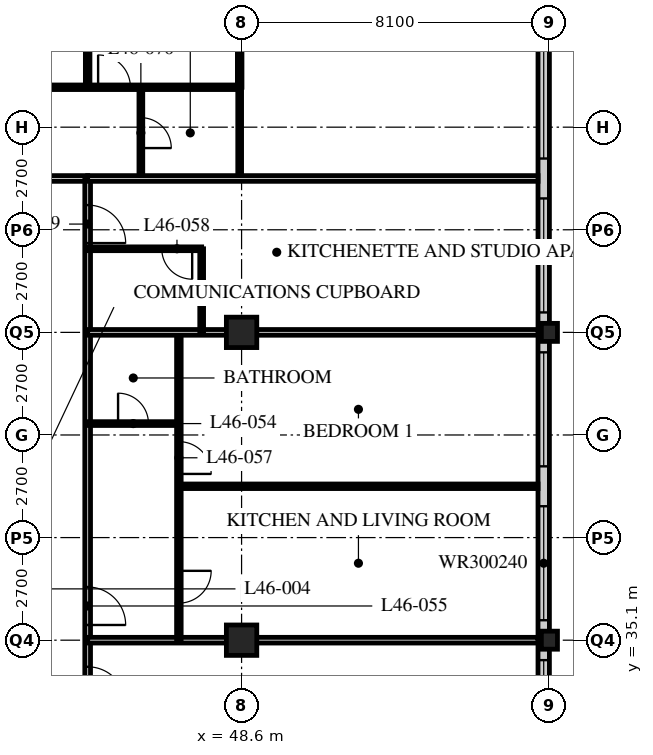
"""IFC4 building model, lengths in metres.
Left out: names, types, materials, properties, quantities, classifications, styles, units other than length and angle.
Written with IfcOpenShell. Run it as: python <this file> out.ifc"""

import sys

from ifc_helpers import new_model, si_unit, direction, frame, frame_2d, origin, origin_2d, place, context, subcontext, project, spatial, rectangle, hollow_rectangle, i_section, extrude, element, fill, save


model = new_model("IFC4")
c1 = context("Model", 3, precision=1e-05, world=origin(), true_north=direction((0.0, 1.0)))
c2 = subcontext(c1, "Body", "Model", "MODEL_VIEW")
j1 = project(units=[si_unit("LENGTHUNIT", "METRE"), si_unit("PLANEANGLEUNIT", "RADIAN")], contexts=[c1])
p1 = place(None, origin())
s1 = spatial("IfcSite", under=j1, at=p1, CompositionType="ELEMENT")
p2 = place(p1, origin())
s2 = spatial("IfcBuilding", under=s1, at=p2, CompositionType="ELEMENT")
p3 = place(p2, frame((0.0, 0.0, 181.2)))
s3 = spatial("IfcBuildingStorey", under=s2, at=p3, CompositionType="ELEMENT", Elevation=181.2)
for number, where, z_axis, x_axis in (
    (1, (48.6, 35.1, 0.0), (0.0, 0.0, 1.0), (1.0, 0.0, 0.0)),
    (2, (48.6, 43.2, 0.0), (0.0, 0.0, 1.0), (1.0, 0.0, 0.0)),
):
    element("IfcColumn", number, at=place(p3, frame(where, z_axis=z_axis, x_axis=x_axis)), inside=s3, PredefinedType="COLUMN", context=c2, shape_type="SweptSolid", body=[
        extrude(hollow_rectangle(XDim=0.8, YDim=0.8, WallThickness=0.08, at=origin_2d()), origin(), (0.0, 0.0, 1.0), 3.6),
    ])
for number, where, z_axis, x_axis in (
    (3, (56.7, 35.1, 0.0), (0.0, 0.0, 1.0), (1.0, 0.0, 0.0)),
    (4, (56.7, 43.2, 0.0), (0.0, 0.0, 1.0), (1.0, 0.0, 0.0)),
):
    element("IfcColumn", number, at=place(p3, frame(where, z_axis=z_axis, x_axis=x_axis)), inside=s3, PredefinedType="COLUMN", context=c2, shape_type="SweptSolid", body=[
        extrude(i_section(OverallWidth=0.424, OverallDepth=0.475, WebThickness=0.048, FlangeThickness=0.077, FilletRadius=0.015, at=origin_2d()), origin(), (0.0, 0.0, 1.0), 3.6),
    ])
p4 = place(p3, frame((56.55, 19.2, 0.0), z_axis=(0.0, 0.0, 1.0), x_axis=(0.0, 1.0, 0.0)))
e5 = element("IfcWall", 5, at=p4, inside=s3, PredefinedType="SOLIDWALL", context=c2, shape_type="SweptSolid", body=[
    extrude(rectangle(XDim=32.1, YDim=0.3, at=frame_2d((16.05, 0.0))), origin(), (0.0, 0.0, 1.0), 3.39),
])
p5 = place(p4, frame((0.225, 0.0, 0.6)))
e6 = element("IfcOpeningElement", 6, at=p5, cuts=e5, PredefinedType="OPENING", context=c2, shape_type="SweptSolid", body=[
    extrude(rectangle(XDim=3.0, YDim=2.4, at=frame_2d((1.5, 1.2))), frame((0.0, 0.16, 0.0), z_axis=(0.0, -1.0, 0.0), x_axis=(1.0, 0.0, 0.0)), (0.0, 0.0, 1.0), 0.32),
])
p6 = place(p4, frame((4.275, 0.0, 0.6)))
e7 = element("IfcOpeningElement", 7, at=p6, cuts=e5, PredefinedType="OPENING", context=c2, shape_type="SweptSolid", body=[
    extrude(rectangle(XDim=3.0, YDim=2.4, at=frame_2d((1.5, 1.2))), frame((0.0, 0.16, 0.0), z_axis=(0.0, -1.0, 0.0), x_axis=(1.0, 0.0, 0.0)), (0.0, 0.0, 1.0), 0.32),
])
p7 = place(p4, frame((8.325, 0.0, 0.6)))
e8 = element("IfcOpeningElement", 8, at=p7, cuts=e5, PredefinedType="OPENING", context=c2, shape_type="SweptSolid", body=[
    extrude(rectangle(XDim=3.0, YDim=2.4, at=frame_2d((1.5, 1.2))), frame((0.0, 0.16, 0.0), z_axis=(0.0, -1.0, 0.0), x_axis=(1.0, 0.0, 0.0)), (0.0, 0.0, 1.0), 0.32),
])
p8 = place(p4, frame((12.375, 0.0, 0.6)))
e9 = element("IfcOpeningElement", 9, at=p8, cuts=e5, PredefinedType="OPENING", context=c2, shape_type="SweptSolid", body=[
    extrude(rectangle(XDim=3.0, YDim=2.4, at=frame_2d((1.5, 1.2))), frame((0.0, 0.16, 0.0), z_axis=(0.0, -1.0, 0.0), x_axis=(1.0, 0.0, 0.0)), (0.0, 0.0, 1.0), 0.32),
])
p9 = place(p4, frame((16.425, 0.0, 0.6)))
e10 = element("IfcOpeningElement", 10, at=p9, cuts=e5, PredefinedType="OPENING", context=c2, shape_type="SweptSolid", body=[
    extrude(rectangle(XDim=3.0, YDim=2.4, at=frame_2d((1.5, 1.2))), frame((0.0, 0.16, 0.0), z_axis=(0.0, -1.0, 0.0), x_axis=(1.0, 0.0, 0.0)), (0.0, 0.0, 1.0), 0.32),
])
p10 = place(p4, frame((20.475, 0.0, 0.6)))
e11 = element("IfcOpeningElement", 11, at=p10, cuts=e5, PredefinedType="OPENING", context=c2, shape_type="SweptSolid", body=[
    extrude(rectangle(XDim=3.0, YDim=2.4, at=frame_2d((1.5, 1.2))), frame((0.0, 0.16, 0.0), z_axis=(0.0, -1.0, 0.0), x_axis=(1.0, 0.0, 0.0)), (0.0, 0.0, 1.0), 0.32),
])
p11 = place(p4, frame((24.525, 0.0, 0.6)))
e12 = element("IfcOpeningElement", 12, at=p11, cuts=e5, PredefinedType="OPENING", context=c2, shape_type="SweptSolid", body=[
    extrude(rectangle(XDim=3.0, YDim=2.4, at=frame_2d((1.5, 1.2))), frame((0.0, 0.16, 0.0), z_axis=(0.0, -1.0, 0.0), x_axis=(1.0, 0.0, 0.0)), (0.0, 0.0, 1.0), 0.32),
])
p12 = place(p4, frame((28.575, 0.0, 0.6)))
e13 = element("IfcOpeningElement", 13, at=p12, cuts=e5, PredefinedType="OPENING", context=c2, shape_type="SweptSolid", body=[
    extrude(rectangle(XDim=3.0, YDim=2.4, at=frame_2d((1.5, 1.2))), frame((0.0, 0.16, 0.0), z_axis=(0.0, -1.0, 0.0), x_axis=(1.0, 0.0, 0.0)), (0.0, 0.0, 1.0), 0.32),
])
p13 = place(p3, frame((12.15, 47.25, 0.0), z_axis=(0.0, 0.0, 1.0), x_axis=(1.0, 0.0, 0.0)))
e14 = element("IfcWall", 14, at=p13, inside=s3, PredefinedType="PARTITIONING", context=c2, shape_type="SweptSolid", body=[
    extrude(rectangle(XDim=32.4, YDim=0.15, at=frame_2d((16.2, 0.0))), origin(), (0.0, 0.0, 1.0), 3.39),
])
p14 = place(p13, frame((4.45, 0.0, 0.0)))
e15 = element("IfcOpeningElement", 15, at=p14, cuts=e14, PredefinedType="OPENING", context=c2, shape_type="SweptSolid", body=[
    extrude(rectangle(XDim=1.0, YDim=2.1, at=frame_2d((0.5, 1.05))), frame((0.0, 0.085, 0.0), z_axis=(0.0, -1.0, 0.0), x_axis=(1.0, 0.0, 0.0)), (0.0, 0.0, 1.0), 0.17),
])
p15 = place(p13, frame((16.6, 0.0, 0.0)))
e16 = element("IfcOpeningElement", 16, at=p15, cuts=e14, PredefinedType="OPENING", context=c2, shape_type="SweptSolid", body=[
    extrude(rectangle(XDim=1.0, YDim=2.1, at=frame_2d((0.5, 1.05))), frame((0.0, 0.085, 0.0), z_axis=(0.0, -1.0, 0.0), x_axis=(1.0, 0.0, 0.0)), (0.0, 0.0, 1.0), 0.17),
])
p16 = place(p13, frame((29.875, 0.0, 0.0)))
e17 = element("IfcOpeningElement", 17, at=p16, cuts=e14, PredefinedType="OPENING", context=c2, shape_type="SweptSolid", body=[
    extrude(rectangle(XDim=1.0, YDim=2.1, at=frame_2d((0.5, 1.05))), frame((0.0, 0.085, 0.0), z_axis=(0.0, -1.0, 0.0), x_axis=(1.0, 0.0, 0.0)), (0.0, 0.0, 1.0), 0.17),
])
p17 = place(p13, frame((1.525, 0.0, 0.0)))
e18 = element("IfcOpeningElement", 18, at=p17, cuts=e14, PredefinedType="OPENING", context=c2, shape_type="SweptSolid", body=[
    extrude(rectangle(XDim=1.0, YDim=2.1, at=frame_2d((0.5, 1.05))), frame((0.0, 0.085, 0.0), z_axis=(0.0, -1.0, 0.0), x_axis=(1.0, 0.0, 0.0)), (0.0, 0.0, 1.0), 0.17),
])
p18 = place(p3, frame((44.55, 18.9, 0.0), z_axis=(0.0, 0.0, 1.0), x_axis=(0.0, 1.0, 0.0)))
e19 = element("IfcWall", 19, at=p18, inside=s3, PredefinedType="PARTITIONING", context=c2, shape_type="SweptSolid", body=[
    extrude(rectangle(XDim=28.35, YDim=0.15, at=frame_2d((14.175, 0.0))), origin(), (0.0, 0.0, 1.0), 3.39),
])
p19 = place(p18, frame((0.4, 0.0, 0.0)))
e20 = element("IfcOpeningElement", 20, at=p19, cuts=e19, PredefinedType="OPENING", context=c2, shape_type="SweptSolid", body=[
    extrude(rectangle(XDim=1.0, YDim=2.1, at=frame_2d((0.5, 1.05))), frame((0.0, 0.085, 0.0), z_axis=(0.0, -1.0, 0.0), x_axis=(1.0, 0.0, 0.0)), (0.0, 0.0, 1.0), 0.17),
])
p20 = place(p18, frame((10.45, 0.0, 0.0)))
e21 = element("IfcOpeningElement", 21, at=p20, cuts=e19, PredefinedType="OPENING", context=c2, shape_type="SweptSolid", body=[
    extrude(rectangle(XDim=1.0, YDim=2.1, at=frame_2d((0.5, 1.05))), frame((0.0, 0.085, 0.0), z_axis=(0.0, -1.0, 0.0), x_axis=(1.0, 0.0, 0.0)), (0.0, 0.0, 1.0), 0.17),
])
p21 = place(p18, frame((14.5, 0.0, 0.0)))
e22 = element("IfcOpeningElement", 22, at=p21, cuts=e19, PredefinedType="OPENING", context=c2, shape_type="SweptSolid", body=[
    extrude(rectangle(XDim=1.0, YDim=2.1, at=frame_2d((0.5, 1.05))), frame((0.0, 0.085, 0.0), z_axis=(0.0, -1.0, 0.0), x_axis=(1.0, 0.0, 0.0)), (0.0, 0.0, 1.0), 0.17),
])
p22 = place(p18, frame((16.6, 0.0, 0.0)))
e23 = element("IfcOpeningElement", 23, at=p22, cuts=e19, PredefinedType="OPENING", context=c2, shape_type="SweptSolid", body=[
    extrude(rectangle(XDim=1.0, YDim=2.1, at=frame_2d((0.5, 1.05))), frame((0.0, 0.085, 0.0), z_axis=(0.0, -1.0, 0.0), x_axis=(1.0, 0.0, 0.0)), (0.0, 0.0, 1.0), 0.17),
])
p23 = place(p18, frame((26.65, 0.0, 0.0)))
e24 = element("IfcOpeningElement", 24, at=p23, cuts=e19, PredefinedType="OPENING", context=c2, shape_type="SweptSolid", body=[
    extrude(rectangle(XDim=1.0, YDim=2.1, at=frame_2d((0.5, 1.05))), frame((0.0, 0.085, 0.0), z_axis=(0.0, -1.0, 0.0), x_axis=(1.0, 0.0, 0.0)), (0.0, 0.0, 1.0), 0.17),
])
p24 = place(p3, frame((44.55, 35.1, 0.0), z_axis=(0.0, 0.0, 1.0), x_axis=(1.0, 0.0, 0.0)))
e25 = element("IfcWall", 25, at=p24, inside=s3, PredefinedType="PARTITIONING", context=c2, shape_type="SweptSolid", body=[
    extrude(rectangle(XDim=11.85, YDim=0.15, at=frame_2d((5.925, 0.0))), origin(), (0.0, 0.0, 1.0), 2.778),
])
p25 = place(p3, frame((46.95, 35.1, 0.0), z_axis=(0.0, 0.0, 1.0), x_axis=(0.0, 1.0, 0.0)))
e26 = element("IfcWall", 26, at=p25, inside=s3, PredefinedType="PARTITIONING", context=c2, shape_type="SweptSolid", body=[
    extrude(rectangle(XDim=8.1, YDim=0.12, at=frame_2d((4.05, 0.0))), origin(), (0.0, 0.0, 1.0), 3.39),
])
p26 = place(p25, frame((0.975, 0.0, 0.0)))
e27 = element("IfcOpeningElement", 27, at=p26, cuts=e26, PredefinedType="OPENING", context=c2, shape_type="SweptSolid", body=[
    extrude(rectangle(XDim=0.85, YDim=2.1, at=frame_2d((0.425, 1.05))), frame((0.0, 0.07, 0.0), z_axis=(0.0, -1.0, 0.0), x_axis=(1.0, 0.0, 0.0)), (0.0, 0.0, 1.0), 0.14),
])
p27 = place(p25, frame((4.375, 0.0, 0.0)))
e28 = element("IfcOpeningElement", 28, at=p27, cuts=e26, PredefinedType="OPENING", context=c2, shape_type="SweptSolid", body=[
    extrude(rectangle(XDim=0.85, YDim=2.1, at=frame_2d((0.425, 1.05))), frame((0.0, 0.07, 0.0), z_axis=(0.0, -1.0, 0.0), x_axis=(1.0, 0.0, 0.0)), (0.0, 0.0, 1.0), 0.14),
])
p28 = place(p3, frame((44.55, 40.8, 0.0), z_axis=(0.0, 0.0, 1.0), x_axis=(1.0, 0.0, 0.0)))
e29 = element("IfcWall", 29, at=p28, inside=s3, PredefinedType="PARTITIONING", context=c2, shape_type="SweptSolid", body=[
    extrude(rectangle(XDim=2.4, YDim=0.1, at=frame_2d((1.2, 0.0))), origin(), (0.0, 0.0, 1.0), 3.39),
])
p29 = place(p28, frame((0.8, 0.0, 0.0)))
e30 = element("IfcOpeningElement", 30, at=p29, cuts=e29, PredefinedType="OPENING", context=c2, shape_type="SweptSolid", body=[
    extrude(rectangle(XDim=0.8, YDim=2.1, at=frame_2d((0.4, 1.05))), frame((0.0, 0.06, 0.0), z_axis=(0.0, -1.0, 0.0), x_axis=(1.0, 0.0, 0.0)), (0.0, 0.0, 1.0), 0.12),
])
p30 = place(p3, frame((46.95, 39.15, 0.0), z_axis=(0.0, 0.0, 1.0), x_axis=(1.0, 0.0, 0.0)))
e31 = element("IfcWall", 31, at=p30, inside=s3, PredefinedType="PARTITIONING", context=c2, shape_type="SweptSolid", body=[
    extrude(rectangle(XDim=9.45, YDim=0.12, at=frame_2d((4.725, 0.0))), origin(), (0.0, 0.0, 1.0), 3.39),
])
p31 = place(p3, frame((44.55, 43.2, 0.0), z_axis=(0.0, 0.0, 1.0), x_axis=(1.0, 0.0, 0.0)))
e32 = element("IfcWall", 32, at=p31, inside=s3, PredefinedType="PARTITIONING", context=c2, shape_type="SweptSolid", body=[
    extrude(rectangle(XDim=11.85, YDim=0.15, at=frame_2d((5.925, 0.0))), origin(), (0.0, 0.0, 1.0), 2.778),
])
p32 = place(p3, frame((47.55, 43.2, 0.0), z_axis=(0.0, 0.0, 1.0), x_axis=(0.0, 1.0, 0.0)))
e33 = element("IfcWall", 33, at=p32, inside=s3, PredefinedType="PARTITIONING", context=c2, shape_type="SweptSolid", body=[
    extrude(rectangle(XDim=2.2, YDim=0.1, at=frame_2d((1.1, 0.0))), origin(), (0.0, 0.0, 1.0), 3.39),
])
p33 = place(p3, frame((44.55, 45.4, 0.0), z_axis=(0.0, 0.0, 1.0), x_axis=(1.0, 0.0, 0.0)))
e34 = element("IfcWall", 34, at=p33, inside=s3, PredefinedType="PARTITIONING", context=c2, shape_type="SweptSolid", body=[
    extrude(rectangle(XDim=3.0, YDim=0.1, at=frame_2d((1.5, 0.0))), origin(), (0.0, 0.0, 1.0), 3.39),
])
p34 = place(p33, frame((1.95, 0.0, 0.0)))
e35 = element("IfcOpeningElement", 35, at=p34, cuts=e34, PredefinedType="OPENING", context=c2, shape_type="SweptSolid", body=[
    extrude(rectangle(XDim=0.8, YDim=2.1, at=frame_2d((0.4, 1.05))), frame((0.0, 0.06, 0.0), z_axis=(0.0, -1.0, 0.0), x_axis=(1.0, 0.0, 0.0)), (0.0, 0.0, 1.0), 0.12),
])
p35 = place(p3, frame((45.95, 47.25, 0.0), z_axis=(0.0, 0.0, 1.0), x_axis=(0.0, 1.0, 0.0)))
e36 = element("IfcWall", 36, at=p35, inside=s3, PredefinedType="PARTITIONING", context=c2, shape_type="SweptSolid", body=[
    extrude(rectangle(XDim=2.4, YDim=0.1, at=frame_2d((1.2, 0.0))), origin(), (0.0, 0.0, 1.0), 3.39),
])
p36 = place(p35, frame((0.8, 0.0, 0.0)))
e37 = element("IfcOpeningElement", 37, at=p36, cuts=e36, PredefinedType="OPENING", context=c2, shape_type="SweptSolid", body=[
    extrude(rectangle(XDim=0.8, YDim=2.1, at=frame_2d((0.4, 1.05))), frame((0.0, 0.06, 0.0), z_axis=(0.0, -1.0, 0.0), x_axis=(1.0, 0.0, 0.0)), (0.0, 0.0, 1.0), 0.12),
])
p37 = place(p3, frame((48.55, 47.25, 0.0), z_axis=(0.0, 0.0, 1.0), x_axis=(0.0, 1.0, 0.0)))
e38 = element("IfcWall", 38, at=p37, inside=s3, PredefinedType="PARTITIONING", context=c2, shape_type="SweptSolid", body=[
    extrude(rectangle(XDim=2.4, YDim=0.1, at=frame_2d((1.2, 0.0))), origin(), (0.0, 0.0, 1.0), 2.778),
])
p38 = place(p3, frame((44.55, 49.65, 0.0), z_axis=(0.0, 0.0, 1.0), x_axis=(0.0, 1.0, 0.0)))
e39 = element("IfcWall", 39, at=p38, inside=s3, PredefinedType="PARTITIONING", context=c2, shape_type="SweptSolid", body=[
    extrude(rectangle(XDim=9.45, YDim=0.12, at=frame_2d((4.725, 0.0))), origin(), (0.0, 0.0, 1.0), 3.39),
])
p39 = place(p3, frame((44.55, 47.25, 0.0), z_axis=(0.0, 0.0, 1.0), x_axis=(1.0, 0.0, 0.0)))
e40 = element("IfcWall", 40, at=p39, inside=s3, PredefinedType="PARTITIONING", context=c2, shape_type="SweptSolid", body=[
    extrude(rectangle(XDim=11.85, YDim=0.15, at=frame_2d((5.925, 0.0))), origin(), (0.0, 0.0, 1.0), 3.39),
])
p40 = place(p3, frame((8.15, 49.65, 0.0), z_axis=(0.0, 0.0, 1.0), x_axis=(1.0, 0.0, 0.0)))
e41 = element("IfcWall", 41, at=p40, inside=s3, PredefinedType="PARTITIONING", context=c2, shape_type="SweptSolid", body=[
    extrude(rectangle(XDim=40.4, YDim=0.12, at=frame_2d((20.2, 0.0))), origin(), (0.0, 0.0, 1.0), 3.39),
])
p41 = place(p40, frame((9.025, 0.0, 0.0)))
e42 = element("IfcOpeningElement", 42, at=p41, cuts=e41, PredefinedType="OPENING", context=c2, shape_type="SweptSolid", body=[
    extrude(rectangle(XDim=0.85, YDim=2.1, at=frame_2d((0.425, 1.05))), frame((0.0, 0.07, 0.0), z_axis=(0.0, -1.0, 0.0), x_axis=(1.0, 0.0, 0.0)), (0.0, 0.0, 1.0), 0.14),
])
p42 = place(p40, frame((16.475, 0.0, 0.0)))
e43 = element("IfcOpeningElement", 43, at=p42, cuts=e41, PredefinedType="OPENING", context=c2, shape_type="SweptSolid", body=[
    extrude(rectangle(XDim=0.85, YDim=2.1, at=frame_2d((0.425, 1.05))), frame((0.0, 0.07, 0.0), z_axis=(0.0, -1.0, 0.0), x_axis=(1.0, 0.0, 0.0)), (0.0, 0.0, 1.0), 0.14),
])
p43 = place(p40, frame((21.175, 0.0, 0.0)))
e44 = element("IfcOpeningElement", 44, at=p43, cuts=e41, PredefinedType="OPENING", context=c2, shape_type="SweptSolid", body=[
    extrude(rectangle(XDim=0.85, YDim=2.1, at=frame_2d((0.425, 1.05))), frame((0.0, 0.07, 0.0), z_axis=(0.0, -1.0, 0.0), x_axis=(1.0, 0.0, 0.0)), (0.0, 0.0, 1.0), 0.14),
])
p44 = place(p40, frame((28.625, 0.0, 0.0)))
e45 = element("IfcOpeningElement", 45, at=p44, cuts=e41, PredefinedType="OPENING", context=c2, shape_type="SweptSolid", body=[
    extrude(rectangle(XDim=0.85, YDim=2.1, at=frame_2d((0.425, 1.05))), frame((0.0, 0.07, 0.0), z_axis=(0.0, -1.0, 0.0), x_axis=(1.0, 0.0, 0.0)), (0.0, 0.0, 1.0), 0.14),
])
p45 = place(p40, frame((32.825, 0.0, 0.0)))
e46 = element("IfcOpeningElement", 46, at=p45, cuts=e41, PredefinedType="OPENING", context=c2, shape_type="SweptSolid", body=[
    extrude(rectangle(XDim=0.85, YDim=2.1, at=frame_2d((0.425, 1.05))), frame((0.0, 0.07, 0.0), z_axis=(0.0, -1.0, 0.0), x_axis=(1.0, 0.0, 0.0)), (0.0, 0.0, 1.0), 0.14),
])
p46 = place(p40, frame((36.675, 0.0, 0.0)))
e47 = element("IfcOpeningElement", 47, at=p46, cuts=e41, PredefinedType="OPENING", context=c2, shape_type="SweptSolid", body=[
    extrude(rectangle(XDim=0.85, YDim=2.1, at=frame_2d((0.425, 1.05))), frame((0.0, 0.07, 0.0), z_axis=(0.0, -1.0, 0.0), x_axis=(1.0, 0.0, 0.0)), (0.0, 0.0, 1.0), 0.14),
])
p47 = place(p40, frame((6.725, 0.0, 0.0)))
e48 = element("IfcOpeningElement", 48, at=p47, cuts=e41, PredefinedType="OPENING", context=c2, shape_type="SweptSolid", body=[
    extrude(rectangle(XDim=0.85, YDim=2.1, at=frame_2d((0.425, 1.05))), frame((0.0, 0.07, 0.0), z_axis=(0.0, -1.0, 0.0), x_axis=(1.0, 0.0, 0.0)), (0.0, 0.0, 1.0), 0.14),
])
p48 = place(p40, frame((2.875, 0.0, 0.0)))
e49 = element("IfcOpeningElement", 49, at=p48, cuts=e41, PredefinedType="OPENING", context=c2, shape_type="SweptSolid", body=[
    extrude(rectangle(XDim=0.85, YDim=2.1, at=frame_2d((0.425, 1.05))), frame((0.0, 0.07, 0.0), z_axis=(0.0, -1.0, 0.0), x_axis=(1.0, 0.0, 0.0)), (0.0, 0.0, 1.0), 0.14),
])
p49 = place(p3, frame((48.55, 49.65, 0.0), z_axis=(0.0, 0.0, 1.0), x_axis=(0.0, 1.0, 0.0)))
e50 = element("IfcWall", 50, at=p49, inside=s3, PredefinedType="PARTITIONING", context=c2, shape_type="SweptSolid", body=[
    extrude(rectangle(XDim=1.25, YDim=0.12, at=frame_2d((0.625, 0.0))), origin(), (0.0, 0.0, 1.0), 2.778),
])
p50 = place(p8, origin())
e51 = element("IfcWindow", 51, at=p50, inside=s3, PartitioningType="SINGLE_PANEL", PredefinedType="WINDOW", context=c2, shape_type="SweptSolid", body=[
    extrude(rectangle(XDim=3.0, YDim=2.4, at=frame_2d((1.5, 1.2))), frame((0.0, 0.03, 0.0), z_axis=(0.0, -1.0, 0.0), x_axis=(1.0, 0.0, 0.0)), (0.0, 0.0, 1.0), 0.06),
])
fill(e9, e51)
p51 = place(p9, origin())
e52 = element("IfcWindow", 52, at=p51, inside=s3, PartitioningType="SINGLE_PANEL", PredefinedType="WINDOW", context=c2, shape_type="SweptSolid", body=[
    extrude(rectangle(XDim=3.0, YDim=2.4, at=frame_2d((1.5, 1.2))), frame((0.0, 0.03, 0.0), z_axis=(0.0, -1.0, 0.0), x_axis=(1.0, 0.0, 0.0)), (0.0, 0.0, 1.0), 0.06),
])
fill(e10, e52)
p52 = place(p10, origin())
e53 = element("IfcWindow", 53, at=p52, inside=s3, PartitioningType="SINGLE_PANEL", PredefinedType="WINDOW", context=c2, shape_type="SweptSolid", body=[
    extrude(rectangle(XDim=3.0, YDim=2.4, at=frame_2d((1.5, 1.2))), frame((0.0, 0.03, 0.0), z_axis=(0.0, -1.0, 0.0), x_axis=(1.0, 0.0, 0.0)), (0.0, 0.0, 1.0), 0.06),
])
fill(e11, e53)
p53 = place(p11, origin())
e54 = element("IfcWindow", 54, at=p53, inside=s3, PartitioningType="SINGLE_PANEL", PredefinedType="WINDOW", context=c2, shape_type="SweptSolid", body=[
    extrude(rectangle(XDim=3.0, YDim=2.4, at=frame_2d((1.5, 1.2))), frame((0.0, 0.03, 0.0), z_axis=(0.0, -1.0, 0.0), x_axis=(1.0, 0.0, 0.0)), (0.0, 0.0, 1.0), 0.06),
])
fill(e12, e54)
p54 = place(p12, origin())
e55 = element("IfcWindow", 55, at=p54, inside=s3, PartitioningType="SINGLE_PANEL", PredefinedType="WINDOW", context=c2, shape_type="SweptSolid", body=[
    extrude(rectangle(XDim=3.0, YDim=2.4, at=frame_2d((1.5, 1.2))), frame((0.0, 0.03, 0.0), z_axis=(0.0, -1.0, 0.0), x_axis=(1.0, 0.0, 0.0)), (0.0, 0.0, 1.0), 0.06),
])
fill(e13, e55)
p55 = place(p21, origin())
e56 = element("IfcDoor", 56, at=p55, inside=s3, OperationType="SINGLE_SWING_RIGHT", PredefinedType="DOOR", context=c2, shape_type="SweptSolid", body=[
    extrude(rectangle(XDim=1.0, YDim=2.1, at=frame_2d((0.5, 1.05))), frame((0.0, 0.025, 0.0), z_axis=(0.0, -1.0, 0.0), x_axis=(1.0, 0.0, 0.0)), (0.0, 0.0, 1.0), 0.05),
])
fill(e22, e56)
p56 = place(p29, origin())
e57 = element("IfcDoor", 57, at=p56, inside=s3, OperationType="SINGLE_SWING_LEFT", PredefinedType="DOOR", context=c2, shape_type="SweptSolid", body=[
    extrude(rectangle(XDim=0.8, YDim=2.1, at=frame_2d((0.4, 1.05))), frame((0.0, 0.025, 0.0), z_axis=(0.0, -1.0, 0.0), x_axis=(1.0, 0.0, 0.0)), (0.0, 0.0, 1.0), 0.05),
])
fill(e30, e57)
p57 = place(p22, origin())
e58 = element("IfcDoor", 58, at=p57, inside=s3, OperationType="SINGLE_SWING_RIGHT", PredefinedType="DOOR", context=c2, shape_type="SweptSolid", body=[
    extrude(rectangle(XDim=1.0, YDim=2.1, at=frame_2d((0.5, 1.05))), frame((0.0, 0.025, 0.0), z_axis=(0.0, -1.0, 0.0), x_axis=(1.0, 0.0, 0.0)), (0.0, 0.0, 1.0), 0.05),
])
fill(e23, e58)
p58 = place(p26, origin())
e59 = element("IfcDoor", 59, at=p58, inside=s3, OperationType="SINGLE_SWING_LEFT", PredefinedType="DOOR", context=c2, shape_type="SweptSolid", body=[
    extrude(rectangle(XDim=0.85, YDim=2.1, at=frame_2d((0.425, 1.05))), frame((0.0, 0.025, 0.0), z_axis=(0.0, -1.0, 0.0), x_axis=(1.0, 0.0, 0.0)), (0.0, 0.0, 1.0), 0.05),
])
fill(e27, e59)
p59 = place(p27, origin())
e60 = element("IfcDoor", 60, at=p59, inside=s3, OperationType="SINGLE_SWING_RIGHT", PredefinedType="DOOR", context=c2, shape_type="SweptSolid", body=[
    extrude(rectangle(XDim=0.85, YDim=2.1, at=frame_2d((0.425, 1.05))), frame((0.0, 0.025, 0.0), z_axis=(0.0, -1.0, 0.0), x_axis=(1.0, 0.0, 0.0)), (0.0, 0.0, 1.0), 0.05),
])
fill(e28, e60)
p60 = place(p34, origin())
e61 = element("IfcDoor", 61, at=p60, inside=s3, OperationType="SINGLE_SWING_LEFT", PredefinedType="DOOR", context=c2, shape_type="SweptSolid", body=[
    extrude(rectangle(XDim=0.8, YDim=2.1, at=frame_2d((0.4, 1.05))), frame((0.0, 0.025, 0.0), z_axis=(0.0, -1.0, 0.0), x_axis=(1.0, 0.0, 0.0)), (0.0, 0.0, 1.0), 0.05),
])
fill(e35, e61)
p61 = place(p23, origin())
e62 = element("IfcDoor", 62, at=p61, inside=s3, OperationType="SINGLE_SWING_RIGHT", PredefinedType="DOOR", context=c2, shape_type="SweptSolid", body=[
    extrude(rectangle(XDim=1.0, YDim=2.1, at=frame_2d((0.5, 1.05))), frame((0.0, 0.025, 0.0), z_axis=(0.0, -1.0, 0.0), x_axis=(1.0, 0.0, 0.0)), (0.0, 0.0, 1.0), 0.05),
])
fill(e24, e62)
p62 = place(p36, origin())
e63 = element("IfcDoor", 63, at=p62, inside=s3, OperationType="SINGLE_SWING_RIGHT", PredefinedType="DOOR", context=c2, shape_type="SweptSolid", body=[
    extrude(rectangle(XDim=0.8, YDim=2.1, at=frame_2d((0.4, 1.05))), frame((0.0, 0.025, 0.0), z_axis=(0.0, -1.0, 0.0), x_axis=(1.0, 0.0, 0.0)), (0.0, 0.0, 1.0), 0.05),
])
fill(e37, e63)
p63 = place(p46, origin())
e64 = element("IfcDoor", 64, at=p63, inside=s3, OperationType="SINGLE_SWING_LEFT", PredefinedType="DOOR", context=c2, shape_type="SweptSolid", body=[
    extrude(rectangle(XDim=0.85, YDim=2.1, at=frame_2d((0.425, 1.05))), frame((0.0, 0.025, 0.0), z_axis=(0.0, -1.0, 0.0), x_axis=(1.0, 0.0, 0.0)), (0.0, 0.0, 1.0), 0.05),
])
fill(e47, e64)
save(model, sys.argv[1])
